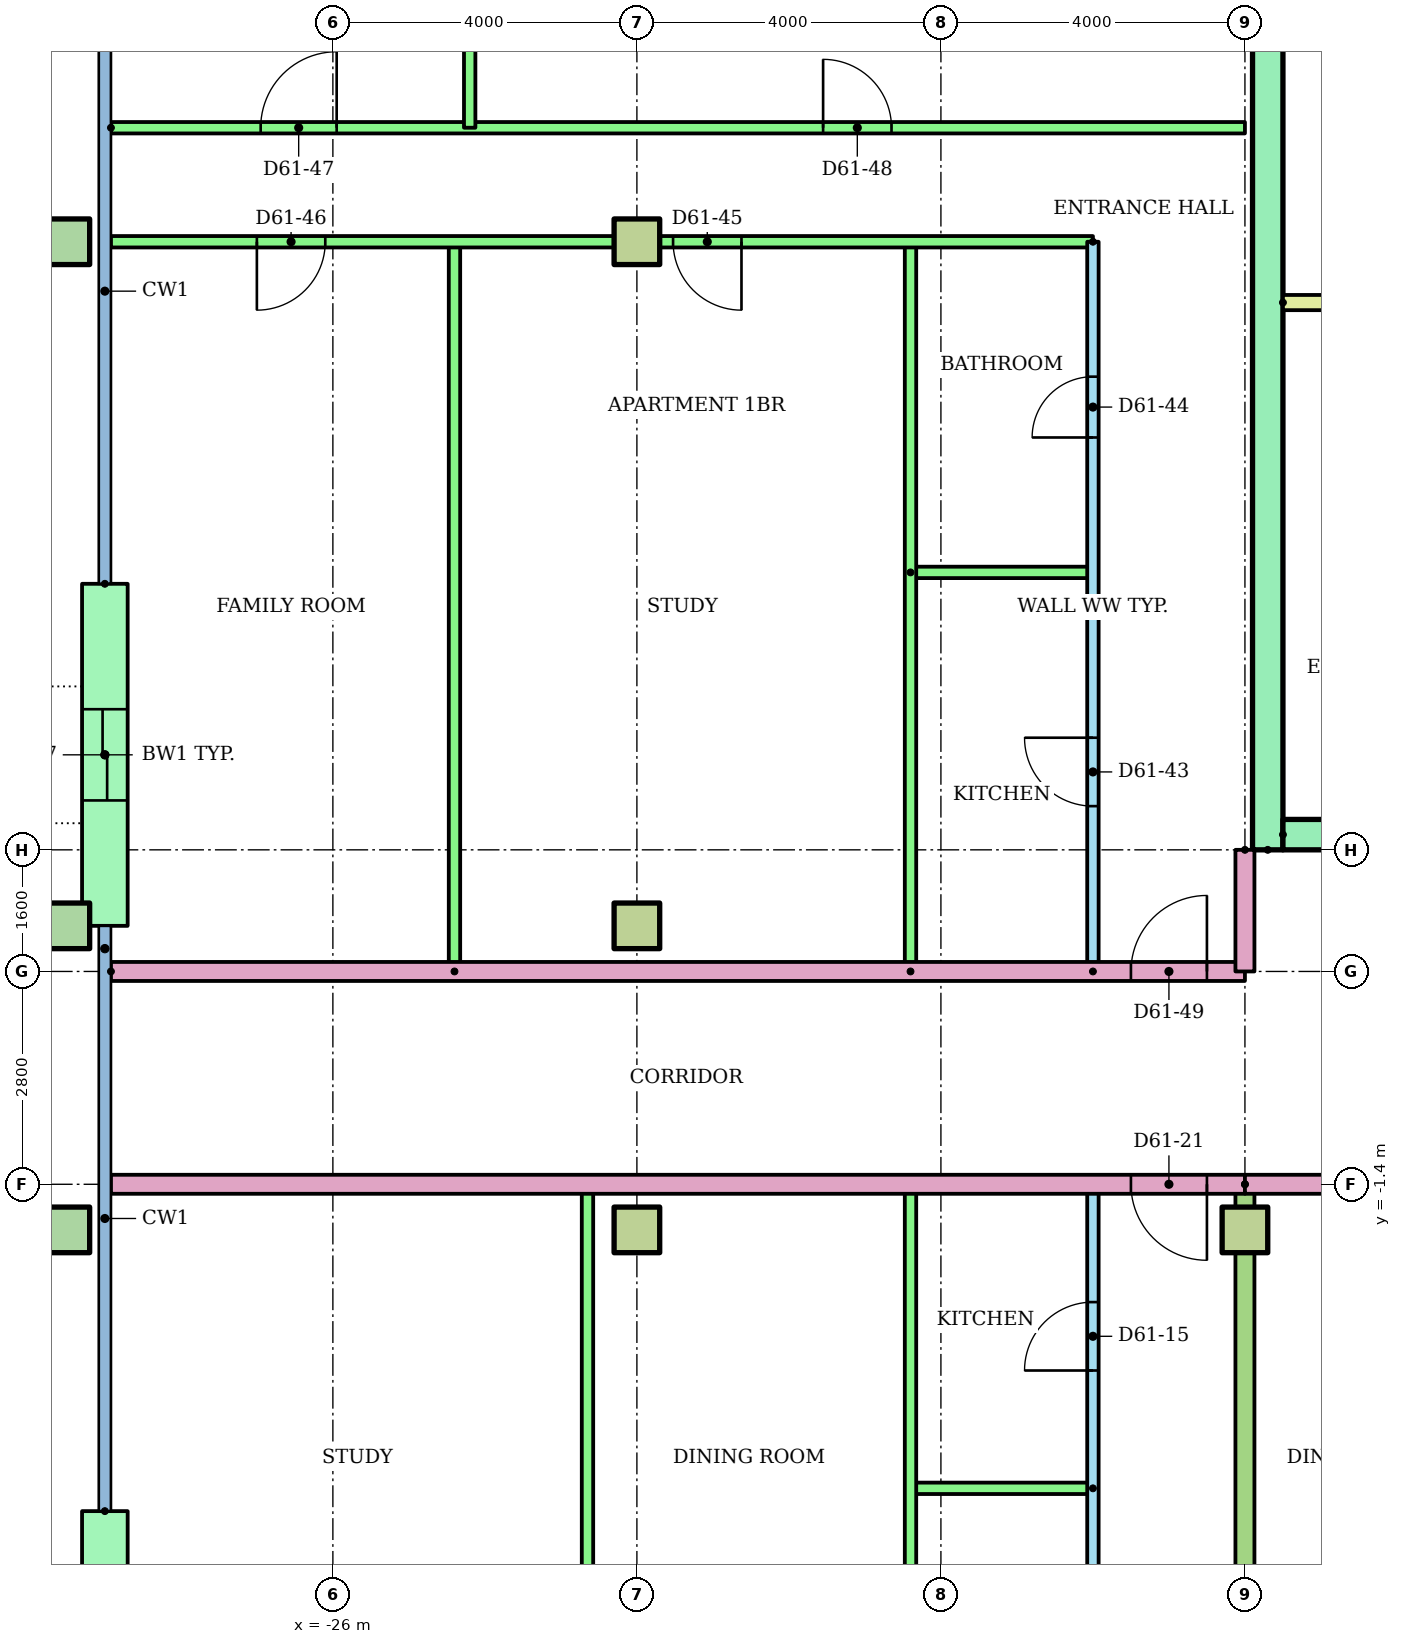
"""IFC4 building model, lengths in metres.
Left out: names, types, materials, properties, quantities, classifications, styles, units other than length and angle.
Written with IfcOpenShell. Run it as: python <this file> out.ifc"""

import sys

from ifc_helpers import new_model, si_unit, direction, frame, frame_2d, origin, origin_2d, place, context, subcontext, project, spatial, rectangle, hollow_rectangle, extrude, element, fill, save


model = new_model("IFC4")
c1 = context("Model", 3, precision=1e-05, world=origin(), true_north=direction((0.0, 1.0)))
c2 = subcontext(c1, "Body", "Model", "MODEL_VIEW")
j1 = project(units=[si_unit("LENGTHUNIT", "METRE"), si_unit("PLANEANGLEUNIT", "RADIAN")], contexts=[c1])
p1 = place(None, origin())
s1 = spatial("IfcSite", under=j1, at=p1, CompositionType="ELEMENT")
p2 = place(p1, origin())
s2 = spatial("IfcBuilding", under=s1, at=p2, CompositionType="ELEMENT")
p3 = place(p2, frame((0.0, 0.0, 233.2)))
s3 = spatial("IfcBuildingStorey", under=s2, at=p3, CompositionType="ELEMENT", Elevation=233.2)
p4 = place(p3, frame((-29.5, -2.0, 0.0)))
e1 = element("IfcColumn", 1, at=p4, inside=s3, PredefinedType="COLUMN", context=c2, shape_type="SweptSolid", body=[
    extrude(hollow_rectangle(XDim=0.6, YDim=0.6, WallThickness=0.03, at=origin_2d()), origin(), (0.0, 0.0, 1.0), 3.2),
])
for number, where in (
    (2, (-22.0, -2.0, 0.0)),
    (3, (-14.0, -2.0, 0.0)),
):
    element("IfcColumn", number, at=place(p3, frame(where)), inside=s3, PredefinedType="COLUMN", context=c2, shape_type="SweptSolid", body=[
        extrude(rectangle(XDim=0.6, YDim=0.6, at=origin_2d()), origin(), (0.0, 0.0, 1.0), 3.2),
    ])
p5 = place(p3, frame((-29.5, 2.0, 0.0)))
e4 = element("IfcColumn", 4, at=p5, inside=s3, PredefinedType="COLUMN", context=c2, shape_type="SweptSolid", body=[
    extrude(hollow_rectangle(XDim=0.6, YDim=0.6, WallThickness=0.03, at=origin_2d()), origin(), (0.0, 0.0, 1.0), 3.2),
])
p6 = place(p3, frame((-22.0, 2.0, 0.0)))
e5 = element("IfcColumn", 5, at=p6, inside=s3, PredefinedType="COLUMN", context=c2, shape_type="SweptSolid", body=[
    extrude(rectangle(XDim=0.6, YDim=0.6, at=origin_2d()), origin(), (0.0, 0.0, 1.0), 3.2),
])
p7 = place(p3, frame((-29.5, 11.0, 0.0)))
e6 = element("IfcColumn", 6, at=p7, inside=s3, PredefinedType="COLUMN", context=c2, shape_type="SweptSolid", body=[
    extrude(hollow_rectangle(XDim=0.6, YDim=0.6, WallThickness=0.03, at=origin_2d()), origin(), (0.0, 0.0, 1.0), 3.2),
])
p8 = place(p3, frame((-22.0, 11.0, 0.0)))
e7 = element("IfcColumn", 7, at=p8, inside=s3, PredefinedType="COLUMN", context=c2, shape_type="SweptSolid", body=[
    extrude(rectangle(XDim=0.6, YDim=0.6, at=origin_2d()), origin(), (0.0, 0.0, 1.0), 3.2),
])
p9 = place(p3, frame((-29.0, 6.5, 0.0), z_axis=(0.0, 0.0, 1.0), x_axis=(0.0, -1.0, 0.0)))
e8 = element("IfcWall", 8, at=p9, inside=s3, PredefinedType="STANDARD", context=c2, shape_type="SweptSolid", body=[
    extrude(rectangle(XDim=4.5, YDim=0.6, at=frame_2d((2.25, 0.0))), origin(), (0.0, 0.0, 1.0), 2.92),
])
p10 = place(p9, frame((1.65, 0.0, 0.0)))
e9 = element("IfcOpeningElement", 9, at=p10, cuts=e8, PredefinedType="OPENING", context=c2, shape_type="SweptSolid", body=[
    extrude(rectangle(XDim=1.2, YDim=2.1, at=frame_2d((0.6, 1.05))), frame((0.0, 0.31, 0.0), z_axis=(0.0, -1.0, 0.0), x_axis=(1.0, 0.0, 0.0)), (0.0, 0.0, 1.0), 0.62),
])
p11 = place(p3, frame((-29.0, -5.7, 0.0), z_axis=(0.0, 0.0, 1.0), x_axis=(0.0, -1.0, 0.0)))
e10 = element("IfcWall", 10, at=p11, inside=s3, PredefinedType="STANDARD", context=c2, shape_type="SweptSolid", body=[
    extrude(rectangle(XDim=3.7, YDim=0.6, at=frame_2d((1.85, 0.0))), origin(), (0.0, 0.0, 1.0), 2.92),
])
p12 = place(p11, frame((1.25, 0.0, 0.0)))
e11 = element("IfcOpeningElement", 11, at=p12, cuts=e10, PredefinedType="OPENING", context=c2, shape_type="SweptSolid", body=[
    extrude(rectangle(XDim=1.2, YDim=2.1, at=frame_2d((0.6, 1.05))), frame((0.0, 0.31, 0.0), z_axis=(0.0, -1.0, 0.0), x_axis=(1.0, 0.0, 0.0)), (0.0, 0.0, 1.0), 0.62),
])
p13 = place(p3, frame((-13.7, 3.0, 0.0), z_axis=(0.0, 0.0, 1.0), x_axis=(0.0, 1.0, 0.0)))
e12 = element("IfcWall", 12, at=p13, inside=s3, PredefinedType="SHEAR", context=c2, shape_type="SweptSolid", body=[
    extrude(rectangle(XDim=17.0, YDim=0.4, at=frame_2d((8.5, 0.0))), origin(), (0.0, 0.0, 1.0), 2.92),
])
p14 = place(p3, frame((-13.5, 3.2, 0.0)))
e13 = element("IfcWall", 13, at=p14, inside=s3, PredefinedType="SHEAR", context=c2, shape_type="SweptSolid", body=[
    extrude(rectangle(XDim=27.0, YDim=0.4, at=frame_2d((13.5, 0.0))), origin(), (0.0, 0.0, 1.0), 2.92),
])
p15 = place(p14, frame((22.083, 0.0, 0.0)))
e14 = element("IfcOpeningElement", 14, at=p15, cuts=e13, PredefinedType="OPENING", context=c2, shape_type="SweptSolid", body=[
    extrude(rectangle(XDim=1.1, YDim=2.1, at=frame_2d((0.55, 1.05))), frame((0.0, 0.21, 0.0), z_axis=(0.0, -1.0, 0.0), x_axis=(1.0, 0.0, 0.0)), (0.0, 0.0, 1.0), 0.42),
])
p16 = place(p14, frame((25.128, 0.0, 0.0)))
e15 = element("IfcOpeningElement", 15, at=p16, cuts=e13, PredefinedType="OPENING", context=c2, shape_type="SweptSolid", body=[
    extrude(rectangle(XDim=1.1, YDim=2.1, at=frame_2d((0.55, 1.05))), frame((0.0, 0.21, 0.0), z_axis=(0.0, -1.0, 0.0), x_axis=(1.0, 0.0, 0.0)), (0.0, 0.0, 1.0), 0.42),
])
p17 = place(p14, frame((12.6, 0.0, 0.0)))
e16 = element("IfcOpeningElement", 16, at=p17, cuts=e13, PredefinedType="OPENING", context=c2, shape_type="SweptSolid", body=[
    extrude(rectangle(XDim=1.8, YDim=2.1, at=frame_2d((0.9, 1.05))), frame((0.0, 0.21, 0.0), z_axis=(0.0, -1.0, 0.0), x_axis=(1.0, 0.0, 0.0)), (0.0, 0.0, 1.0), 0.42),
])
p18 = place(p3, frame((-13.5, 10.2, 0.0)))
e17 = element("IfcWall", 17, at=p18, inside=s3, PredefinedType="PARTITIONING", context=c2, shape_type="SweptSolid", body=[
    extrude(rectangle(XDim=3.9, YDim=0.2, at=frame_2d((1.95, 0.0))), origin(), (0.0, 0.0, 1.0), 2.92),
])
p19 = place(p3, frame((-16.0, -8.6, 0.0), z_axis=(0.0, 0.0, 1.0), x_axis=(0.0, 1.0, 0.0)))
e18 = element("IfcWall", 18, at=p19, inside=s3, PredefinedType="PARTITIONING", context=c2, shape_type="SweptSolid", body=[
    extrude(rectangle(XDim=7.2, YDim=0.15, at=frame_2d((3.6, 0.0))), origin(), (0.0, 0.0, 1.0), 2.4),
])
p20 = place(p19, frame((4.75, 0.0, 0.0)))
e19 = element("IfcOpeningElement", 19, at=p20, cuts=e18, PredefinedType="OPENING", context=c2, shape_type="SweptSolid", body=[
    extrude(rectangle(XDim=0.9, YDim=2.1, at=frame_2d((0.45, 1.05))), frame((0.0, 0.085, 0.0), z_axis=(0.0, -1.0, 0.0), x_axis=(1.0, 0.0, 0.0)), (0.0, 0.0, 1.0), 0.17),
])
p21 = place(p19, frame((1.2, 0.0, 0.0)))
e20 = element("IfcOpeningElement", 20, at=p21, cuts=e18, PredefinedType="OPENING", context=c2, shape_type="SweptSolid", body=[
    extrude(rectangle(XDim=0.8, YDim=2.1, at=frame_2d((0.4, 1.05))), frame((0.0, 0.085, 0.0), z_axis=(0.0, -1.0, 0.0), x_axis=(1.0, 0.0, 0.0)), (0.0, 0.0, 1.0), 0.17),
])
p22 = place(p3, frame((-16.0, -5.4, 0.0), z_axis=(0.0, 0.0, 1.0), x_axis=(-1.0, 0.0, 0.0)))
e21 = element("IfcWall", 21, at=p22, inside=s3, PredefinedType="PARTITIONING", context=c2, shape_type="SweptSolid", body=[
    extrude(rectangle(XDim=2.4, YDim=0.15, at=frame_2d((1.2, 0.0))), origin(), (0.0, 0.0, 1.0), 2.4),
])
for number, where, z_axis, x_axis in (
    (22, (-18.4, -8.6, 0.0), (0.0, 0.0, 1.0), (0.0, 1.0, 0.0)),
    (23, (-22.65, -8.6, 0.0), (0.0, 0.0, 1.0), (0.0, 1.0, 0.0)),
):
    element("IfcWall", number, at=place(p3, frame(where, z_axis=z_axis, x_axis=x_axis)), inside=s3, PredefinedType="PARTITIONING", context=c2, shape_type="SweptSolid", body=[
        extrude(rectangle(XDim=7.2, YDim=0.15, at=frame_2d((3.6, 0.0))), origin(), (0.0, 0.0, 1.0), 2.4),
    ])
p23 = place(p3, frame((-14.0, -1.4, 0.0), z_axis=(0.0, 0.0, 1.0), x_axis=(0.0, -1.0, 0.0)))
e24 = element("IfcWall", 24, at=p23, inside=s3, PredefinedType="PARTITIONING", context=c2, shape_type="SweptSolid", body=[
    extrude(rectangle(XDim=15.11, YDim=0.25, at=frame_2d((7.555, 0.0))), origin(), (0.0, 0.0, 1.0), 2.4),
])
p24 = place(p3, frame((-14.0, -1.4, 0.0), z_axis=(0.0, 0.0, 1.0), x_axis=(-1.0, 0.0, 0.0)))
e25 = element("IfcWall", 25, at=p24, inside=s3, PredefinedType="PARTITIONING", context=c2, shape_type="SweptSolid", body=[
    extrude(rectangle(XDim=14.92, YDim=0.25, at=frame_2d((7.46, 0.0))), origin(), (0.0, 0.0, 1.0), 2.4),
])
p25 = place(p24, frame((0.5, 0.0, 0.0)))
e26 = element("IfcOpeningElement", 26, at=p25, cuts=e25, PredefinedType="OPENING", context=c2, shape_type="SweptSolid", body=[
    extrude(rectangle(XDim=1.0, YDim=2.1, at=frame_2d((0.5, 1.05))), frame((0.0, 0.135, 0.0), z_axis=(0.0, -1.0, 0.0), x_axis=(1.0, 0.0, 0.0)), (0.0, 0.0, 1.0), 0.27),
])
p26 = place(p3, frame((-16.0, 1.4, 0.0), z_axis=(0.0, 0.0, 1.0), x_axis=(0.0, 1.0, 0.0)))
e27 = element("IfcWall", 27, at=p26, inside=s3, PredefinedType="PARTITIONING", context=c2, shape_type="SweptSolid", body=[
    extrude(rectangle(XDim=9.6, YDim=0.15, at=frame_2d((4.8, 0.0))), origin(), (0.0, 0.0, 1.0), 2.4),
])
p27 = place(p26, frame((2.175, 0.0, 0.0)))
e28 = element("IfcOpeningElement", 28, at=p27, cuts=e27, PredefinedType="OPENING", context=c2, shape_type="SweptSolid", body=[
    extrude(rectangle(XDim=0.9, YDim=2.1, at=frame_2d((0.45, 1.05))), frame((0.0, 0.085, 0.0), z_axis=(0.0, -1.0, 0.0), x_axis=(1.0, 0.0, 0.0)), (0.0, 0.0, 1.0), 0.17),
])
p28 = place(p26, frame((7.025, 0.0, 0.0)))
e29 = element("IfcOpeningElement", 29, at=p28, cuts=e27, PredefinedType="OPENING", context=c2, shape_type="SweptSolid", body=[
    extrude(rectangle(XDim=0.8, YDim=2.1, at=frame_2d((0.4, 1.05))), frame((0.0, 0.085, 0.0), z_axis=(0.0, -1.0, 0.0), x_axis=(1.0, 0.0, 0.0)), (0.0, 0.0, 1.0), 0.17),
])
p29 = place(p3, frame((-18.4, 6.65, 0.0)))
e30 = element("IfcWall", 30, at=p29, inside=s3, PredefinedType="PARTITIONING", context=c2, shape_type="SweptSolid", body=[
    extrude(rectangle(XDim=2.4, YDim=0.15, at=frame_2d((1.2, 0.0))), origin(), (0.0, 0.0, 1.0), 2.4),
])
for number, where, z_axis, x_axis in (
    (31, (-18.4, 1.4, 0.0), (0.0, 0.0, 1.0), (0.0, 1.0, 0.0)),
    (32, (-24.4, 1.4, 0.0), (0.0, 0.0, 1.0), (0.0, 1.0, 0.0)),
):
    element("IfcWall", number, at=place(p3, frame(where, z_axis=z_axis, x_axis=x_axis)), inside=s3, PredefinedType="PARTITIONING", context=c2, shape_type="SweptSolid", body=[
        extrude(rectangle(XDim=9.6, YDim=0.15, at=frame_2d((4.8, 0.0))), origin(), (0.0, 0.0, 1.0), 2.4),
    ])
p30 = place(p3, frame((-16.0, 11.0, 0.0), z_axis=(0.0, 0.0, 1.0), x_axis=(-1.0, 0.0, 0.0)))
e33 = element("IfcWall", 33, at=p30, inside=s3, PredefinedType="PARTITIONING", context=c2, shape_type="SweptSolid", body=[
    extrude(rectangle(XDim=12.92, YDim=0.15, at=frame_2d((6.46, 0.0))), origin(), (0.0, 0.0, 1.0), 2.4),
])
p31 = place(p30, frame((4.624, 0.0, 0.0)))
e34 = element("IfcOpeningElement", 34, at=p31, cuts=e33, PredefinedType="OPENING", context=c2, shape_type="SweptSolid", body=[
    extrude(rectangle(XDim=0.9, YDim=2.1, at=frame_2d((0.45, 1.05))), frame((0.0, 0.085, 0.0), z_axis=(0.0, -1.0, 0.0), x_axis=(1.0, 0.0, 0.0)), (0.0, 0.0, 1.0), 0.17),
])
p32 = place(p30, frame((10.1, 0.0, 0.0)))
e35 = element("IfcOpeningElement", 35, at=p32, cuts=e33, PredefinedType="OPENING", context=c2, shape_type="SweptSolid", body=[
    extrude(rectangle(XDim=0.9, YDim=2.1, at=frame_2d((0.45, 1.05))), frame((0.0, 0.085, 0.0), z_axis=(0.0, -1.0, 0.0), x_axis=(1.0, 0.0, 0.0)), (0.0, 0.0, 1.0), 0.17),
])
p33 = place(p3, frame((-28.92, 12.5, 0.0)))
e36 = element("IfcWall", 36, at=p33, inside=s3, PredefinedType="PARTITIONING", context=c2, shape_type="SweptSolid", body=[
    extrude(rectangle(XDim=14.92, YDim=0.15, at=frame_2d((7.46, 0.0))), origin(), (0.0, 0.0, 1.0), 2.4),
])
p34 = place(p33, frame((1.97, 0.0, 0.0)))
e37 = element("IfcOpeningElement", 37, at=p34, cuts=e36, PredefinedType="OPENING", context=c2, shape_type="SweptSolid", body=[
    extrude(rectangle(XDim=1.0, YDim=2.1, at=frame_2d((0.5, 1.05))), frame((0.0, 0.085, 0.0), z_axis=(0.0, -1.0, 0.0), x_axis=(1.0, 0.0, 0.0)), (0.0, 0.0, 1.0), 0.17),
])
p35 = place(p33, frame((9.37, 0.0, 0.0)))
e38 = element("IfcOpeningElement", 38, at=p35, cuts=e36, PredefinedType="OPENING", context=c2, shape_type="SweptSolid", body=[
    extrude(rectangle(XDim=0.9, YDim=2.1, at=frame_2d((0.45, 1.05))), frame((0.0, 0.085, 0.0), z_axis=(0.0, -1.0, 0.0), x_axis=(1.0, 0.0, 0.0)), (0.0, 0.0, 1.0), 0.17),
])
p36 = place(p3, frame((-24.2, 17.12, 0.0), z_axis=(0.0, 0.0, 1.0), x_axis=(0.0, -1.0, 0.0)))
e39 = element("IfcWall", 39, at=p36, inside=s3, PredefinedType="PARTITIONING", context=c2, shape_type="SweptSolid", body=[
    extrude(rectangle(XDim=4.62, YDim=0.15, at=frame_2d((2.31, 0.0))), origin(), (0.0, 0.0, 1.0), 2.4),
])
p37 = place(p3, frame((-28.92, 1.4, 0.0)))
e40 = element("IfcWall", 40, at=p37, inside=s3, PredefinedType="PARTITIONING", context=c2, shape_type="SweptSolid", body=[
    extrude(rectangle(XDim=14.92, YDim=0.25, at=frame_2d((7.46, 0.0))), origin(), (0.0, 0.0, 1.0), 2.4),
])
p38 = place(p37, frame((13.42, 0.0, 0.0)))
e41 = element("IfcOpeningElement", 41, at=p38, cuts=e40, PredefinedType="OPENING", context=c2, shape_type="SweptSolid", body=[
    extrude(rectangle(XDim=1.0, YDim=2.1, at=frame_2d((0.5, 1.05))), frame((0.0, 0.135, 0.0), z_axis=(0.0, -1.0, 0.0), x_axis=(1.0, 0.0, 0.0)), (0.0, 0.0, 1.0), 0.27),
])
p39 = place(p3, frame((14.0, -1.4, 0.0), z_axis=(0.0, 0.0, 1.0), x_axis=(-1.0, 0.0, 0.0)))
e42 = element("IfcWall", 42, at=p39, inside=s3, PredefinedType="PARTITIONING", context=c2, shape_type="SweptSolid", body=[
    extrude(rectangle(XDim=28.0, YDim=0.25, at=frame_2d((14.0, 0.0))), origin(), (0.0, 0.0, 1.0), 2.4),
])
p40 = place(p39, frame((12.5, 0.0, 0.0)))
e43 = element("IfcOpeningElement", 43, at=p40, cuts=e42, PredefinedType="OPENING", context=c2, shape_type="SweptSolid", body=[
    extrude(rectangle(XDim=1.0, YDim=2.1, at=frame_2d((0.5, 1.05))), frame((0.0, 0.135, 0.0), z_axis=(0.0, -1.0, 0.0), x_axis=(1.0, 0.0, 0.0)), (0.0, 0.0, 1.0), 0.27),
])
p41 = place(p39, frame((10.5, 0.0, 0.0)))
e44 = element("IfcOpeningElement", 44, at=p41, cuts=e42, PredefinedType="OPENING", context=c2, shape_type="SweptSolid", body=[
    extrude(rectangle(XDim=1.0, YDim=2.1, at=frame_2d((0.5, 1.05))), frame((0.0, 0.135, 0.0), z_axis=(0.0, -1.0, 0.0), x_axis=(1.0, 0.0, 0.0)), (0.0, 0.0, 1.0), 0.27),
])
p42 = place(p3, frame((-14.0, 3.0, 0.0), z_axis=(0.0, 0.0, 1.0), x_axis=(0.0, -1.0, 0.0)))
e45 = element("IfcWall", 45, at=p42, inside=s3, PredefinedType="PARTITIONING", context=c2, shape_type="SweptSolid", body=[
    extrude(rectangle(XDim=1.6, YDim=0.25, at=frame_2d((0.8, 0.0))), origin(), (0.0, 0.0, 1.0), 2.4),
])
p43 = place(p20, origin())
e46 = element("IfcDoor", 46, at=p43, inside=s3, OperationType="SINGLE_SWING_LEFT", PredefinedType="DOOR", context=c2, shape_type="SweptSolid", body=[
    extrude(rectangle(XDim=0.9, YDim=2.1, at=frame_2d((0.45, 1.05))), frame((0.0, 0.025, 0.0), z_axis=(0.0, -1.0, 0.0), x_axis=(1.0, 0.0, 0.0)), (0.0, 0.0, 1.0), 0.05),
])
fill(e19, e46)
p44 = place(p25, origin())
e47 = element("IfcDoor", 47, at=p44, inside=s3, OperationType="SINGLE_SWING_LEFT", PredefinedType="DOOR", context=c2, shape_type="SweptSolid", body=[
    extrude(rectangle(XDim=1.0, YDim=2.1, at=frame_2d((0.5, 1.05))), frame((0.0, 0.025, 0.0), z_axis=(0.0, -1.0, 0.0), x_axis=(1.0, 0.0, 0.0)), (0.0, 0.0, 1.0), 0.05),
])
fill(e26, e47)
p45 = place(p27, origin())
e48 = element("IfcDoor", 48, at=p45, inside=s3, OperationType="SINGLE_SWING_RIGHT", PredefinedType="DOOR", context=c2, shape_type="SweptSolid", body=[
    extrude(rectangle(XDim=0.9, YDim=2.1, at=frame_2d((0.45, 1.05))), frame((0.0, 0.025, 0.0), z_axis=(0.0, -1.0, 0.0), x_axis=(1.0, 0.0, 0.0)), (0.0, 0.0, 1.0), 0.05),
])
fill(e28, e48)
p46 = place(p28, origin())
e49 = element("IfcDoor", 49, at=p46, inside=s3, OperationType="SINGLE_SWING_LEFT", PredefinedType="DOOR", context=c2, shape_type="SweptSolid", body=[
    extrude(rectangle(XDim=0.8, YDim=2.1, at=frame_2d((0.4, 1.05))), frame((0.0, 0.025, 0.0), z_axis=(0.0, -1.0, 0.0), x_axis=(1.0, 0.0, 0.0)), (0.0, 0.0, 1.0), 0.05),
])
fill(e29, e49)
p47 = place(p31, origin())
e50 = element("IfcDoor", 50, at=p47, inside=s3, OperationType="SINGLE_SWING_LEFT", PredefinedType="DOOR", context=c2, shape_type="SweptSolid", body=[
    extrude(rectangle(XDim=0.9, YDim=2.1, at=frame_2d((0.45, 1.05))), frame((0.0, 0.025, 0.0), z_axis=(0.0, -1.0, 0.0), x_axis=(1.0, 0.0, 0.0)), (0.0, 0.0, 1.0), 0.05),
])
fill(e34, e50)
p48 = place(p32, origin())
e51 = element("IfcDoor", 51, at=p48, inside=s3, OperationType="SINGLE_SWING_RIGHT", PredefinedType="DOOR", context=c2, shape_type="SweptSolid", body=[
    extrude(rectangle(XDim=0.9, YDim=2.1, at=frame_2d((0.45, 1.05))), frame((0.0, 0.025, 0.0), z_axis=(0.0, -1.0, 0.0), x_axis=(1.0, 0.0, 0.0)), (0.0, 0.0, 1.0), 0.05),
])
fill(e35, e51)
p49 = place(p34, origin())
e52 = element("IfcDoor", 52, at=p49, inside=s3, OperationType="SINGLE_SWING_RIGHT", PredefinedType="DOOR", context=c2, shape_type="SweptSolid", body=[
    extrude(rectangle(XDim=1.0, YDim=2.1, at=frame_2d((0.5, 1.05))), frame((0.0, 0.025, 0.0), z_axis=(0.0, -1.0, 0.0), x_axis=(1.0, 0.0, 0.0)), (0.0, 0.0, 1.0), 0.05),
])
fill(e37, e52)
p50 = place(p35, origin())
e53 = element("IfcDoor", 53, at=p50, inside=s3, OperationType="SINGLE_SWING_LEFT", PredefinedType="DOOR", context=c2, shape_type="SweptSolid", body=[
    extrude(rectangle(XDim=0.9, YDim=2.1, at=frame_2d((0.45, 1.05))), frame((0.0, 0.025, 0.0), z_axis=(0.0, -1.0, 0.0), x_axis=(1.0, 0.0, 0.0)), (0.0, 0.0, 1.0), 0.05),
])
fill(e38, e53)
p51 = place(p38, origin())
e54 = element("IfcDoor", 54, at=p51, inside=s3, OperationType="SINGLE_SWING_RIGHT", PredefinedType="DOOR", context=c2, shape_type="SweptSolid", body=[
    extrude(rectangle(XDim=1.0, YDim=2.1, at=frame_2d((0.5, 1.05))), frame((0.0, 0.025, 0.0), z_axis=(0.0, -1.0, 0.0), x_axis=(1.0, 0.0, 0.0)), (0.0, 0.0, 1.0), 0.05),
])
fill(e41, e54)
p52 = place(p10, origin())
e55 = element("IfcDoor", 55, at=p52, inside=s3, OperationType="SLIDING_TO_LEFT", PredefinedType="DOOR", context=c2, shape_type="SweptSolid", body=[
    extrude(rectangle(XDim=1.2, YDim=2.1, at=frame_2d((0.6, 1.05))), frame((0.0, 0.025, 0.0), z_axis=(0.0, -1.0, 0.0), x_axis=(1.0, 0.0, 0.0)), (0.0, 0.0, 1.0), 0.05),
])
fill(e9, e55)
save(model, sys.argv[1])
